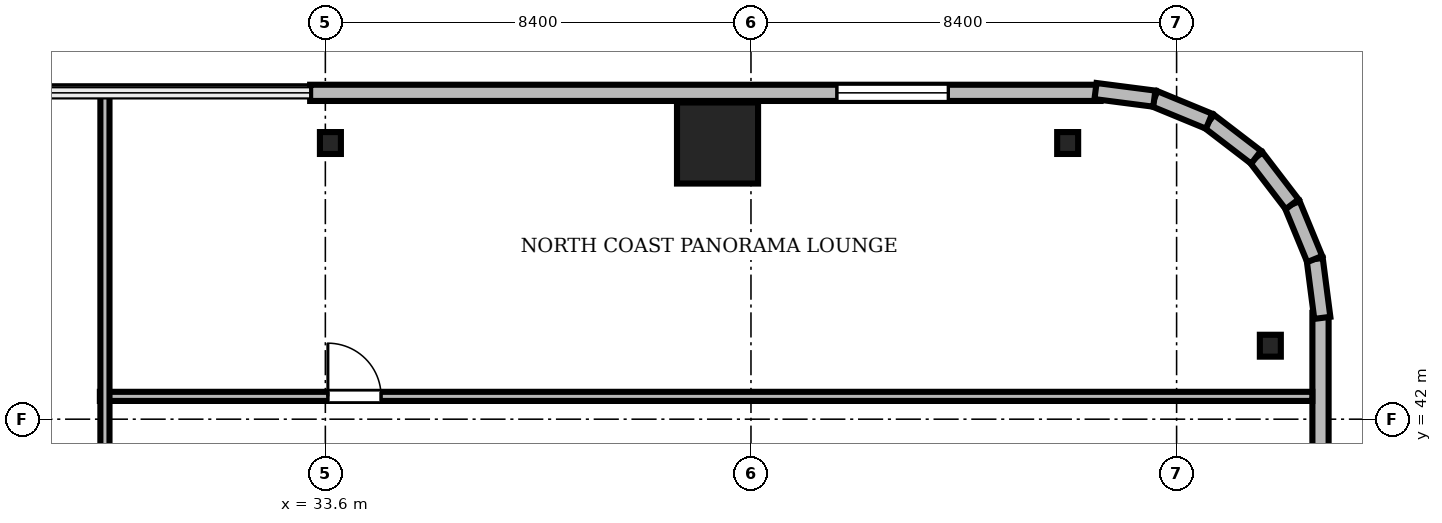
"""IFC4 building model, lengths in metres.
Left out: names, types, materials, properties, quantities, classifications, styles, units other than length and angle.
Written with IfcOpenShell. Run it as: python <this file> out.ifc"""

import sys

from ifc_helpers import new_model, si_unit, direction, frame, frame_2d, origin, origin_2d, place, context, subcontext, project, spatial, rectangle, i_section, extrude, source, transform, mapped, element, fill, save


model = new_model("IFC4")
c1 = context("Model", 3, precision=1e-05, world=origin(), true_north=direction((0.0, 1.0)))
c2 = subcontext(c1, "Body", "Model", "MODEL_VIEW")
j1 = project(units=[si_unit("LENGTHUNIT", "METRE"), si_unit("PLANEANGLEUNIT", "RADIAN")], contexts=[c1])
p1 = place(None, origin())
s1 = spatial("IfcSite", under=j1, at=p1, CompositionType="ELEMENT")
p2 = place(p1, origin())
s2 = spatial("IfcBuilding", under=s1, at=p2, CompositionType="ELEMENT")
p3 = place(p2, frame((0.0, 0.0, 144.6)))
s3 = spatial("IfcBuildingStorey", under=s2, at=p3, CompositionType="ELEMENT", Elevation=144.6)
m1 = source(origin(), c2, "Body", "SweptSolid", [
    extrude(rectangle(XDim=1.6, YDim=1.6, at=origin_2d()), origin(), (0.0, 0.0, 1.0), 3.46),
])
p4 = place(p3, frame((41.34, 47.45, 0.0), z_axis=(0.0, 0.0, 1.0), x_axis=(1.0, 0.0, 0.0)))
e1 = element("IfcColumn", 1, at=p4, inside=s3, PredefinedType="COLUMN", context=c2, shape_type="MappedRepresentation", body=[
    mapped(m1, transform((0.0, 0.0, 0.0), scale=1.0)),
])
m2 = source(origin(), c2, "Body", "SweptSolid", [
    extrude(i_section(OverallWidth=0.414, OverallDepth=0.432, WebThickness=0.026, FlangeThickness=0.04, FilletRadius=0.015, at=origin_2d()), origin(), (0.0, 0.0, 1.0), 3.46),
])
for number, where, z_axis, x_axis in (
    (2, (52.25, 43.45, 0.0), (0.0, 0.0, 1.0), (1.0, 0.0, 0.0)),
    (3, (48.25, 47.45, 0.0), (0.0, 0.0, 1.0), (1.0, 0.0, 0.0)),
    (4, (33.7, 47.45, 0.0), (0.0, 0.0, 1.0), (1.0, 0.0, 0.0)),
):
    element("IfcColumn", number, at=place(p3, frame(where, z_axis=z_axis, x_axis=x_axis)), inside=s3, PredefinedType="COLUMN", context=c2, shape_type="MappedRepresentation", body=[
        mapped(m2, transform((0.0, 0.0, 0.0), scale=1.0)),
    ])
m3 = source(origin(), c2, "Body", "SweptSolid", [
    extrude(rectangle(XDim=15.6, YDim=0.32, at=frame_2d((7.8, 0.0))), origin(), (0.0, 0.0, 1.0), 3.46),
])
p5 = place(p3, frame((48.9, 48.44, 0.0), z_axis=(0.0, 0.0, 1.0), x_axis=(-1.0, 0.0, 0.0)))
e5 = element("IfcWall", 5, at=p5, inside=s3, PredefinedType="SOLIDWALL", context=c2, shape_type="MappedRepresentation", body=[
    mapped(m3, transform((0.0, 0.0, 0.0), scale=1.0)),
])
m4 = source(origin(), c2, "Body", "SweptSolid", [
    extrude(rectangle(XDim=2.2, YDim=2.4, at=frame_2d((1.1, 1.2))), frame((0.0, 0.17, 0.0), z_axis=(0.0, -1.0, 0.0), x_axis=(1.0, 0.0, 0.0)), (0.0, 0.0, 1.0), 0.34),
])
p6 = place(p5, frame((3.005, 0.0, 0.72)))
e6 = element("IfcOpeningElement", 6, at=p6, cuts=e5, PredefinedType="OPENING", context=c2, shape_type="MappedRepresentation", body=[
    mapped(m4, transform((0.0, 0.0, 0.0), scale=1.0)),
])
m5 = source(origin(), c2, "Body", "SweptSolid", [
    extrude(rectangle(XDim=15.6, YDim=0.32, at=frame_2d((7.8, 0.0))), origin(), (0.0, 0.0, 1.0), 3.46),
])
p7 = place(p3, frame((53.24, 28.5, 0.0), z_axis=(0.0, 0.0, 1.0), x_axis=(0.0, 1.0, 0.0)))
e7 = element("IfcWall", 7, at=p7, inside=s3, PredefinedType="SOLIDWALL", context=c2, shape_type="MappedRepresentation", body=[
    mapped(m5, transform((0.0, 0.0, 0.0), scale=1.0)),
])
p8 = place(p7, frame((10.395, 0.0, 0.72)))
e8 = element("IfcOpeningElement", 8, at=p8, cuts=e7, PredefinedType="OPENING", context=c2, shape_type="MappedRepresentation", body=[
    mapped(m4, transform((0.0, 0.0, 0.0), scale=1.0)),
])
m6 = source(origin(), c2, "Body", "SweptSolid", [
    extrude(rectangle(XDim=1.17, YDim=0.32, at=frame_2d((0.585, 0.0))), origin(), (0.0, 0.0, 1.0), 3.46),
])
p9 = place(p3, frame((53.276, 44.0, 0.0), z_axis=(0.0, 0.0, 1.0), x_axis=(-0.128295670475, 0.991735963317, 0.0)))
e9 = element("IfcWall", 9, at=p9, inside=s3, PredefinedType="SOLIDWALL", context=c2, shape_type="MappedRepresentation", body=[
    mapped(m6, transform((0.0, 0.0, 0.0), scale=1.0)),
])
m7 = source(origin(), c2, "Body", "SweptSolid", [
    extrude(rectangle(XDim=1.169, YDim=0.32, at=frame_2d((0.584, 0.0))), origin(), (0.0, 0.0, 1.0), 3.46),
])
p10 = place(p3, frame((53.125, 45.16, 0.0), z_axis=(0.0, 0.0, 1.0), x_axis=(-0.381054331552, 0.924552646638, 0.0)))
e10 = element("IfcWall", 10, at=p10, inside=s3, PredefinedType="SOLIDWALL", context=c2, shape_type="MappedRepresentation", body=[
    mapped(m7, transform((0.0, 0.0, 0.0), scale=1.0)),
])
m8 = source(origin(), c2, "Body", "SweptSolid", [
    extrude(rectangle(XDim=1.169, YDim=0.32, at=frame_2d((0.584, 0.0))), origin(), (0.0, 0.0, 1.0), 3.46),
])
p11 = place(p3, frame((52.68, 46.241, 0.0), z_axis=(0.0, 0.0, 1.0), x_axis=(-0.608387696831, 0.793639975269, 0.0)))
e11 = element("IfcWall", 11, at=p11, inside=s3, PredefinedType="SOLIDWALL", context=c2, shape_type="MappedRepresentation", body=[
    mapped(m8, transform((0.0, 0.0, 0.0), scale=1.0)),
])
m9 = source(origin(), c2, "Body", "SweptSolid", [
    extrude(rectangle(XDim=1.169, YDim=0.32, at=frame_2d((0.584, 0.0))), origin(), (0.0, 0.0, 1.0), 3.46),
])
p12 = place(p3, frame((51.969, 47.169, 0.0), z_axis=(0.0, 0.0, 1.0), x_axis=(-0.793663520347, 0.608356981114, 0.0)))
e12 = element("IfcWall", 12, at=p12, inside=s3, PredefinedType="SOLIDWALL", context=c2, shape_type="MappedRepresentation", body=[
    mapped(m9, transform((0.0, 0.0, 0.0), scale=1.0)),
])
p13 = place(p3, frame((51.041, 47.88, 0.0), z_axis=(0.0, 0.0, 1.0), x_axis=(-0.924552646638, 0.381054331552, 0.0)))
e13 = element("IfcWall", 13, at=p13, inside=s3, PredefinedType="SOLIDWALL", context=c2, shape_type="MappedRepresentation", body=[
    mapped(m7, transform((0.0, 0.0, 0.0), scale=1.0)),
])
p14 = place(p3, frame((49.96, 48.325, 0.0), z_axis=(0.0, 0.0, 1.0), x_axis=(-0.991735963317, 0.128295670475, 0.0)))
e14 = element("IfcWall", 14, at=p14, inside=s3, PredefinedType="SOLIDWALL", context=c2, shape_type="MappedRepresentation", body=[
    mapped(m6, transform((0.0, 0.0, 0.0), scale=1.0)),
])
m10 = source(origin(), c2, "Body", "SweptSolid", [
    extrude(rectangle(XDim=23.928, YDim=0.18, at=frame_2d((11.964, 0.0))), origin(), (0.0, 0.0, 1.0), 2.702),
])
p15 = place(p3, frame((29.15, 42.45, 0.0), z_axis=(0.0, 0.0, 1.0), x_axis=(1.0, 0.0, 0.0)))
e15 = element("IfcWall", 15, at=p15, inside=s3, PredefinedType="PARTITIONING", context=c2, shape_type="MappedRepresentation", body=[
    mapped(m10, transform((0.0, 0.0, 0.0), scale=1.0)),
])
m11 = source(origin(), c2, "Body", "SweptSolid", [
    extrude(rectangle(XDim=1.05, YDim=2.2, at=frame_2d((0.525, 1.1))), frame((0.0, 0.1, 0.0), z_axis=(0.0, -1.0, 0.0), x_axis=(1.0, 0.0, 0.0)), (0.0, 0.0, 1.0), 0.2),
])
p16 = place(p15, frame((4.5, 0.0, 0.0)))
e16 = element("IfcOpeningElement", 16, at=p16, cuts=e15, PredefinedType="OPENING", context=c2, shape_type="MappedRepresentation", body=[
    mapped(m11, transform((0.0, 0.0, 0.0), scale=1.0)),
])
m12 = source(origin(), c2, "Body", "SweptSolid", [
    extrude(rectangle(XDim=11.45, YDim=0.18, at=frame_2d((5.725, 0.0))), origin(), (0.0, 0.0, 1.0), 2.702),
])
p17 = place(p3, frame((29.25, 37.02, 0.0), z_axis=(0.0, 0.0, 1.0), x_axis=(0.0, 1.0, 0.0)))
e17 = element("IfcWall", 17, at=p17, inside=s3, PredefinedType="PARTITIONING", context=c2, shape_type="MappedRepresentation", body=[
    mapped(m12, transform((0.0, 0.0, 0.0), scale=1.0)),
])
m13 = source(origin(), c2, "Body", "SweptSolid", [
    extrude(rectangle(XDim=2.2, YDim=2.4, at=frame_2d((1.1, 1.2))), frame((0.0, 0.03, 0.0), z_axis=(0.0, -1.0, 0.0), x_axis=(1.0, 0.0, 0.0)), (0.0, 0.0, 1.0), 0.06),
])
p18 = place(p6, origin())
e18 = element("IfcWindow", 18, at=p18, inside=s3, PartitioningType="SINGLE_PANEL", PredefinedType="WINDOW", context=c2, shape_type="MappedRepresentation", body=[
    mapped(m13, transform((0.0, 0.0, 0.0), scale=1.0)),
])
fill(e6, e18)
m14 = source(origin(), c2, "Body", "SweptSolid", [
    extrude(rectangle(XDim=1.05, YDim=2.2, at=frame_2d((0.525, 1.1))), frame((0.0, 0.025, 0.0), z_axis=(0.0, -1.0, 0.0), x_axis=(1.0, 0.0, 0.0)), (0.0, 0.0, 1.0), 0.05),
])
p19 = place(p16, origin())
e19 = element("IfcDoor", 19, at=p19, inside=s3, OperationType="SINGLE_SWING_LEFT", PredefinedType="DOOR", context=c2, shape_type="MappedRepresentation", body=[
    mapped(m14, transform((0.0, 0.0, 0.0), scale=1.0)),
])
fill(e16, e19)
save(model, sys.argv[1])
